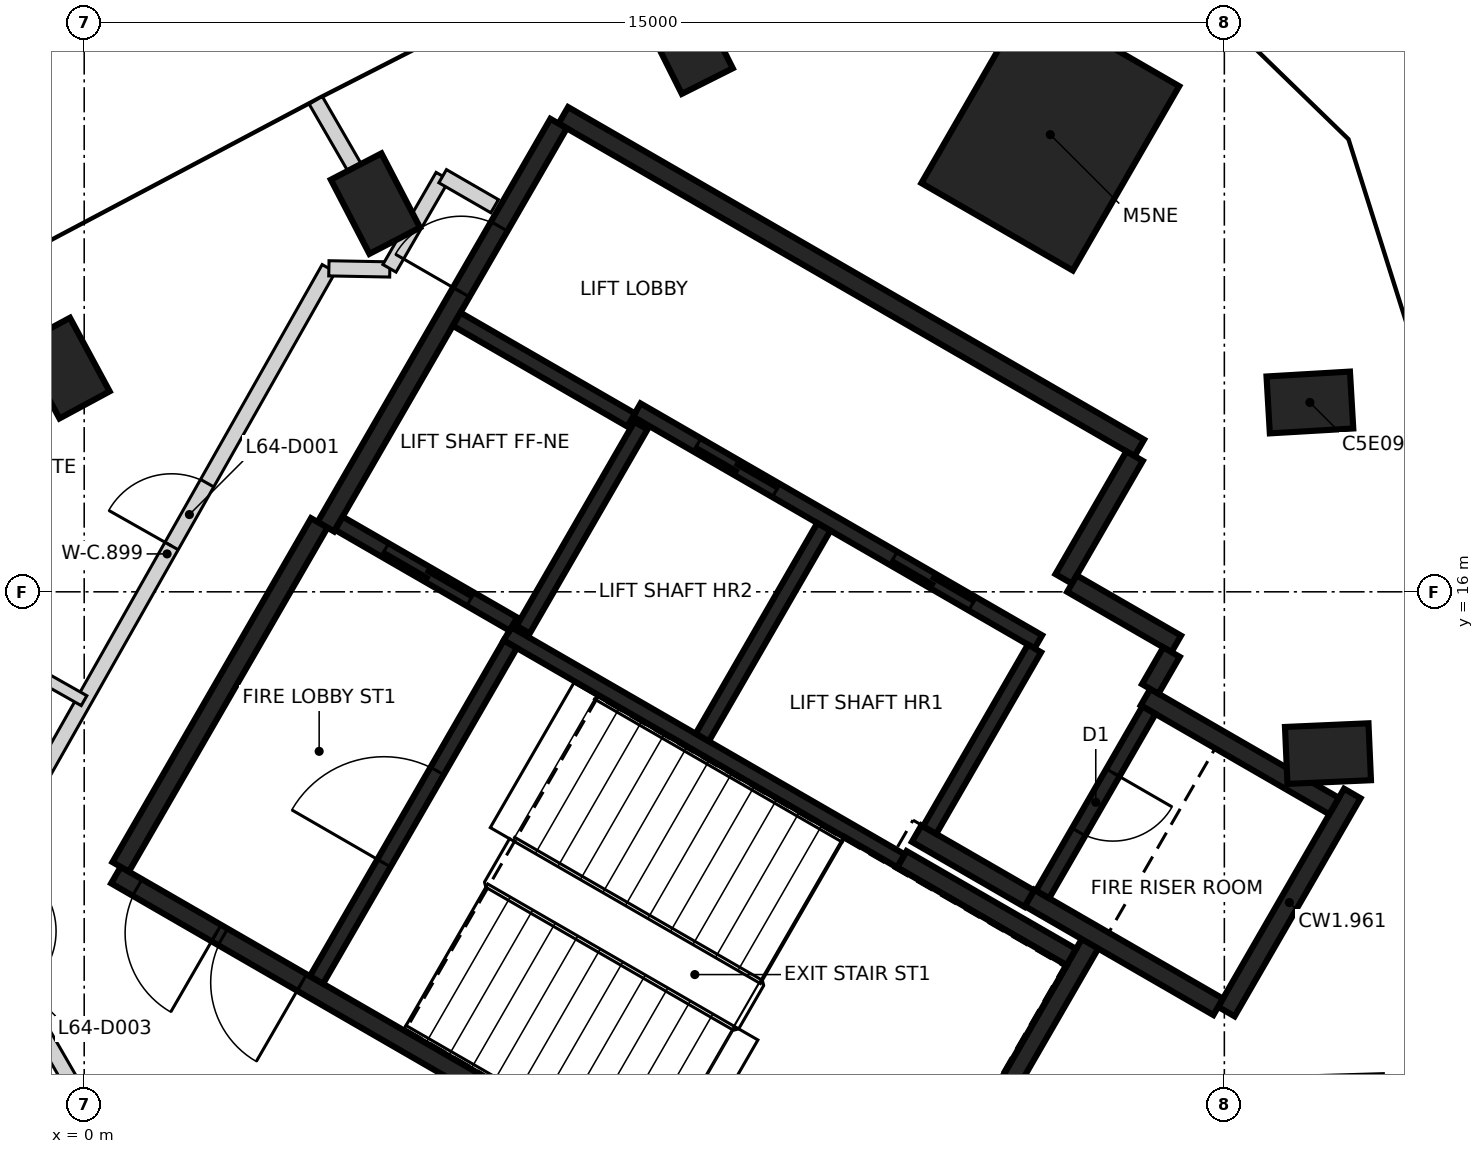
"""IFC4 building model, lengths in metres.
Left out: names, types, materials, properties, quantities, classifications, styles, units other than length and angle.
Written with IfcOpenShell. Run it as: python <this file> out.ifc"""

import sys

from ifc_helpers import new_model, si_unit, direction, frame, frame_2d, origin, origin_2d, place, context, subcontext, project, spatial, rectangle, extrude, element, fill, save


model = new_model("IFC4")
c1 = context("Model", 3, precision=1e-05, world=origin(), true_north=direction((0.0, 1.0)))
c2 = subcontext(c1, "Body", "Model", "MODEL_VIEW")
j1 = project(units=[si_unit("LENGTHUNIT", "METRE"), si_unit("PLANEANGLEUNIT", "RADIAN")], contexts=[c1])
p1 = place(None, origin())
s1 = spatial("IfcSite", under=j1, at=p1, CompositionType="ELEMENT")
p2 = place(p1, origin())
s2 = spatial("IfcBuilding", under=s1, at=p2, CompositionType="ELEMENT")
p3 = place(p2, frame((0.0, 0.0, 253.8)))
s3 = spatial("IfcBuildingStorey", under=s2, at=p3, CompositionType="ELEMENT", Elevation=253.8)
for number, where, z_axis, x_axis in (
    (1, (16.363, 13.872, -0.35), (0.0, 0.0, 1.0), (0.999, 0.044, 0.0)),
    (2, (16.125, 18.491, -0.35), (0.0, 0.0, 1.0), (0.998, 0.058, 0.0)),
    (3, (7.951, 23.211, -0.35), (0.0, 0.0, 1.0), (-0.449, 0.894, 0.0)),
    (4, (3.832, 21.107, -0.35), (0.0, 0.0, 1.0), (-0.461, 0.887, 0.0)),
    (5, (-0.256, 18.943, -0.35), (0.0, 0.0, 1.0), (-0.475, 0.88, 0.0)),
):
    element("IfcColumn", number, at=place(p3, frame(where, z_axis=z_axis, x_axis=x_axis)), inside=s3, PredefinedType="COLUMN", context=c2, shape_type="SweptSolid", body=[
        extrude(rectangle(XDim=1.1, YDim=0.75, at=origin_2d()), origin(), (0.0, 0.0, 1.0), 2.64),
    ])
p4 = place(p3, frame((12.71, 22.015, -0.35), z_axis=(0.0, 0.0, 1.0), x_axis=(0.5, 0.866025403784, 0.0)))
e6 = element("IfcColumn", 6, at=p4, inside=s3, PredefinedType="COLUMN", context=c2, shape_type="SweptSolid", body=[
    extrude(rectangle(XDim=2.8, YDim=2.3, at=origin_2d()), origin(), (0.0, 0.0, 1.0), 3.55),
])
p5 = place(p3, frame((10.42, 6.498, 0.0), z_axis=(0.0, 0.0, 1.0), x_axis=(-0.866021906294, 0.500006057782, 0.0)))
e7 = element("IfcWall", 7, at=p5, inside=s3, PredefinedType="SHEAR", context=c2, shape_type="SweptSolid", body=[
    extrude(rectangle(XDim=11.55, YDim=0.25, at=frame_2d((5.775, 0.0))), origin(), (0.0, 0.0, 1.0), 3.2),
])
p6 = place(p5, frame((10.025, 0.0, 0.0)))
e8 = element("IfcOpeningElement", 8, at=p6, cuts=e7, PredefinedType="OPENING", context=c2, shape_type="SweptSolid", body=[
    extrude(rectangle(XDim=1.2, YDim=2.1, at=frame_2d((0.6, 1.05))), frame((0.0, 0.135, 0.0), z_axis=(0.0, -1.0, 0.0), x_axis=(1.0, 0.0, 0.0)), (0.0, 0.0, 1.0), 0.27),
])
p7 = place(p5, frame((8.725, 0.0, 0.0)))
e9 = element("IfcOpeningElement", 9, at=p7, cuts=e7, PredefinedType="OPENING", context=c2, shape_type="SweptSolid", body=[
    extrude(rectangle(XDim=1.2, YDim=2.1, at=frame_2d((0.6, 1.05))), frame((0.0, 0.135, 0.0), z_axis=(0.0, -1.0, 0.0), x_axis=(1.0, 0.0, 0.0)), (0.0, 0.0, 1.0), 0.27),
])
p8 = place(p3, frame((6.304, 22.269, 0.0), z_axis=(0.0, 0.0, 1.0), x_axis=(0.866022959057, -0.500004234368, 0.0)))
e10 = element("IfcWall", 10, at=p8, inside=s3, PredefinedType="SHEAR", context=c2, shape_type="SweptSolid", body=[
    extrude(rectangle(XDim=8.75, YDim=0.25, at=frame_2d((4.375, 0.0))), origin(), (0.0, 0.0, 1.0), 3.2),
])
p9 = place(p3, frame((3.179, 16.856, 0.0), z_axis=(0.0, 0.0, 1.0), x_axis=(0.500001955336, 0.866024274868, 0.0)))
e11 = element("IfcWall", 11, at=p9, inside=s3, PredefinedType="SHEAR", context=c2, shape_type="SweptSolid", body=[
    extrude(rectangle(XDim=6.125, YDim=0.25, at=frame_2d((3.062, 0.0))), origin(), (0.0, 0.0, 1.0), 3.2),
])
p10 = place(p9, frame((3.563, 0.0, 0.0)))
e12 = element("IfcOpeningElement", 12, at=p10, cuts=e11, PredefinedType="OPENING", context=c2, shape_type="SweptSolid", body=[
    extrude(rectangle(XDim=1.0, YDim=2.1, at=frame_2d((0.5, 1.05))), frame((0.0, 0.135, 0.0), z_axis=(0.0, -1.0, 0.0), x_axis=(1.0, 0.0, 0.0)), (0.0, 0.0, 1.0), 0.27),
])
p11 = place(p3, frame((0.48, 12.381, 0.0), z_axis=(0.0, 0.0, 1.0), x_axis=(0.49999885962, 0.866026062182, 0.0)))
e13 = element("IfcWall", 13, at=p11, inside=s3, PredefinedType="SHEAR", context=c2, shape_type="SweptSolid", body=[
    extrude(rectangle(XDim=5.225, YDim=0.25, at=frame_2d((2.612, 0.0))), origin(), (0.0, 0.0, 1.0), 3.2),
])
p12 = place(p3, frame((13.238, 11.378, 0.0), z_axis=(0.0, 0.0, 1.0), x_axis=(-0.500008851346, -0.866020293397, 0.0)))
e14 = element("IfcWall", 14, at=p12, inside=s3, PredefinedType="SHEAR", context=c2, shape_type="SweptSolid", body=[
    extrude(rectangle(XDim=5.51, YDim=0.25, at=frame_2d((2.755, 0.0))), origin(), (0.0, 0.0, 1.0), 3.2),
])
p13 = place(p3, frame((16.684, 13.347, 0.0), z_axis=(0.0, 0.0, 1.0), x_axis=(-0.499998874531, -0.866026053573, 0.0)))
e15 = element("IfcWall", 15, at=p13, inside=s3, PredefinedType="SHEAR", context=c2, shape_type="SweptSolid", body=[
    extrude(rectangle(XDim=3.313, YDim=0.25, at=frame_2d((1.656, 0.0))), origin(), (0.0, 0.0, 1.0), 3.2),
])
p14 = place(p3, frame((14.918, 10.54, 0.0), z_axis=(0.0, 0.0, 1.0), x_axis=(-0.866063538972, 0.499933942099, 0.0)))
e16 = element("IfcWall", 16, at=p14, inside=s3, PredefinedType="SHEAR", context=c2, shape_type="SweptSolid", body=[
    extrude(rectangle(XDim=2.865, YDim=0.25, at=frame_2d((1.432, 0.0))), origin(), (0.0, 0.0, 1.0), 3.2),
])
p15 = place(p3, frame((13.963, 14.614, 0.0), z_axis=(0.0, 0.0, 1.0), x_axis=(0.866042235819, -0.499970844928, 0.0)))
e17 = element("IfcWall", 17, at=p15, inside=s3, PredefinedType="SHEAR", context=c2, shape_type="SweptSolid", body=[
    extrude(rectangle(XDim=2.865, YDim=0.25, at=frame_2d((1.432, 0.0))), origin(), (0.0, 0.0, 1.0), 3.2),
])
p16 = place(p3, frame((10.757, 12.481, 0.0), z_axis=(0.0, 0.0, 1.0), x_axis=(0.866022940537, -0.500004266446, 0.0)))
e18 = element("IfcWall", 18, at=p16, inside=s3, PredefinedType="SHEAR", context=c2, shape_type="SweptSolid", body=[
    extrude(rectangle(XDim=2.575, YDim=0.25, at=frame_2d((1.287, 0.0))), origin(), (0.0, 0.0, 1.0), 3.2),
])
p17 = place(p3, frame((13.819, 17.785, 0.0), z_axis=(0.0, 0.0, 1.0), x_axis=(-0.500039802285, -0.866002422705, 0.0)))
e19 = element("IfcWall", 19, at=p17, inside=s3, PredefinedType="SHEAR", context=c2, shape_type="SweptSolid", body=[
    extrude(rectangle(XDim=1.865, YDim=0.25, at=frame_2d((0.932, 0.0))), origin(), (0.0, 0.0, 1.0), 3.2),
])
p18 = place(p3, frame((12.433, 11.964, 0.0), z_axis=(0.0, 0.0, 1.0), x_axis=(-0.866038183914, 0.499977863513, 0.0)))
e20 = element("IfcWall", 20, at=p18, inside=s3, PredefinedType="SHEAR", context=c2, shape_type="SweptSolid", body=[
    extrude(rectangle(XDim=1.71, YDim=0.25, at=frame_2d((0.855, 0.0))), origin(), (0.0, 0.0, 1.0), 3.2),
])
p19 = place(p3, frame((12.995, 16.108, 0.0), z_axis=(0.0, 0.0, 1.0), x_axis=(0.866044474677, -0.49996696679, 0.0)))
e21 = element("IfcWall", 21, at=p19, inside=s3, PredefinedType="SHEAR", context=c2, shape_type="SweptSolid", body=[
    extrude(rectangle(XDim=1.584, YDim=0.25, at=frame_2d((0.792, 0.0))), origin(), (0.0, 0.0, 1.0), 3.2),
])
p20 = place(p3, frame((14.305, 15.207, 0.0), z_axis=(0.0, 0.0, 1.0), x_axis=(-0.499848422343, -0.866112899501, 0.0)))
e22 = element("IfcWall", 22, at=p20, inside=s3, PredefinedType="SHEAR", context=c2, shape_type="SweptSolid", body=[
    extrude(rectangle(XDim=0.559, YDim=0.25, at=frame_2d((0.28, 0.0))), origin(), (0.0, 0.0, 1.0), 3.2),
])
p21 = place(p3, frame((12.552, 15.342, 0.0), z_axis=(0.0, 0.0, 1.0), x_axis=(-0.866030299012, 0.499991521122, 0.0)))
e23 = element("IfcWall", 23, at=p21, inside=s3, PredefinedType="SHEAR", context=c2, shape_type="SweptSolid", body=[
    extrude(rectangle(XDim=6.1, YDim=0.2, at=frame_2d((3.05, 0.0))), origin(), (0.0, 0.0, 1.0), 3.2),
])
p22 = place(p21, frame((1.0, 0.0, 0.0)))
e24 = element("IfcOpeningElement", 24, at=p22, cuts=e23, PredefinedType="OPENING", context=c2, shape_type="SweptSolid", body=[
    extrude(rectangle(XDim=1.2, YDim=2.1, at=frame_2d((0.6, 1.05))), frame((0.0, 0.11, 0.0), z_axis=(0.0, -1.0, 0.0), x_axis=(1.0, 0.0, 0.0)), (0.0, 0.0, 1.0), 0.22),
])
p23 = place(p21, frame((3.982, 0.0, 0.0)))
e25 = element("IfcOpeningElement", 25, at=p23, cuts=e23, PredefinedType="OPENING", context=c2, shape_type="SweptSolid", body=[
    extrude(rectangle(XDim=1.2, YDim=2.1, at=frame_2d((0.6, 1.05))), frame((0.0, 0.11, 0.0), z_axis=(0.0, -1.0, 0.0), x_axis=(1.0, 0.0, 0.0)), (0.0, 0.0, 1.0), 0.22),
])
p24 = place(p3, frame((10.743, 12.46, 0.0), z_axis=(0.0, 0.0, 1.0), x_axis=(-0.866018848283, 0.500011354289, 0.0)))
e26 = element("IfcWall", 26, at=p24, inside=s3, PredefinedType="SHEAR", context=c2, shape_type="SweptSolid", body=[
    extrude(rectangle(XDim=5.974, YDim=0.2, at=frame_2d((2.987, 0.0))), origin(), (0.0, 0.0, 1.0), 3.2),
])
p25 = place(p3, frame((3.057, 10.895, 0.0), z_axis=(0.0, 0.0, 1.0), x_axis=(0.500027839223, 0.866009330205, 0.0)))
e27 = element("IfcWall", 27, at=p25, inside=s3, PredefinedType="SHEAR", context=c2, shape_type="SweptSolid", body=[
    extrude(rectangle(XDim=5.098, YDim=0.2, at=frame_2d((2.549, 0.0))), origin(), (0.0, 0.0, 1.0), 3.2),
])
p26 = place(p25, frame((1.774, 0.0, 0.0)))
e28 = element("IfcOpeningElement", 28, at=p26, cuts=e27, PredefinedType="OPENING", context=c2, shape_type="SweptSolid", body=[
    extrude(rectangle(XDim=1.4, YDim=2.1, at=frame_2d((0.7, 1.05))), frame((0.0, 0.11, 0.0), z_axis=(0.0, -1.0, 0.0), x_axis=(1.0, 0.0, 0.0)), (0.0, 0.0, 1.0), 0.22),
])
p27 = place(p3, frame((8.132, 14.084, 0.0), z_axis=(0.0, 0.0, 1.0), x_axis=(0.500030834389, 0.86600760081, 0.0)))
e29 = element("IfcWall", 29, at=p27, inside=s3, PredefinedType="SHEAR", context=c2, shape_type="SweptSolid", body=[
    extrude(rectangle(XDim=3.198, YDim=0.2, at=frame_2d((1.599, 0.0))), origin(), (0.0, 0.0, 1.0), 3.2),
])
p28 = place(p3, frame((14.008, 14.442, 0.0), z_axis=(0.0, 0.0, 1.0), x_axis=(-0.499986818241, -0.866033014143, 0.0)))
e30 = element("IfcWall", 30, at=p28, inside=s3, PredefinedType="SHEAR", context=c2, shape_type="SweptSolid", body=[
    extrude(rectangle(XDim=2.798, YDim=0.2, at=frame_2d((1.399, 0.0))), origin(), (0.0, 0.0, 1.0), 3.2),
])
p29 = place(p28, frame((0.949, 0.0, 0.0)))
e31 = element("IfcOpeningElement", 31, at=p29, cuts=e30, PredefinedType="OPENING", context=c2, shape_type="SweptSolid", body=[
    extrude(rectangle(XDim=0.9, YDim=2.1, at=frame_2d((0.45, 1.05))), frame((0.0, 0.11, 0.0), z_axis=(0.0, -1.0, 0.0), x_axis=(1.0, 0.0, 0.0)), (0.0, 0.0, 1.0), 0.22),
])
p30 = place(p3, frame((12.502, 15.255, 0.0), z_axis=(0.0, 0.0, 1.0), x_axis=(-0.499965018551, -0.866045599391, 0.0)))
e32 = element("IfcWall", 32, at=p30, inside=s3, PredefinedType="SHEAR", context=c2, shape_type="SweptSolid", body=[
    extrude(rectangle(XDim=2.759, YDim=0.2, at=frame_2d((1.379, 0.0))), origin(), (0.0, 0.0, 1.0), 3.2),
])
p31 = place(p3, frame((7.324, 18.187, 0.0), z_axis=(0.0, 0.0, 1.0), x_axis=(-0.499967891604, -0.866043940782, 0.0)))
e33 = element("IfcWall", 33, at=p31, inside=s3, PredefinedType="SHEAR", context=c2, shape_type="SweptSolid", body=[
    extrude(rectangle(XDim=3.1, YDim=0.2, at=frame_2d((1.55, 0.0))), origin(), (0.0, 0.0, 1.0), 3.2),
])
p32 = place(p3, frame((5.646, 15.576, 0.0), z_axis=(0.0, 0.0, 1.0), x_axis=(-0.866018407898, 0.500012117035, 0.0)))
e34 = element("IfcWall", 34, at=p32, inside=s3, PredefinedType="SHEAR", context=c2, shape_type="SweptSolid", body=[
    extrude(rectangle(XDim=2.651, YDim=0.2, at=frame_2d((1.325, 0.0))), origin(), (0.0, 0.0, 1.0), 3.2),
])
p33 = place(p32, frame((0.652, 0.0, 0.0)))
e35 = element("IfcOpeningElement", 35, at=p33, cuts=e34, PredefinedType="OPENING", context=c2, shape_type="SweptSolid", body=[
    extrude(rectangle(XDim=1.3, YDim=2.1, at=frame_2d((0.65, 1.05))), frame((0.0, 0.11, 0.0), z_axis=(0.0, -1.0, 0.0), x_axis=(1.0, 0.0, 0.0)), (0.0, 0.0, 1.0), 0.22),
])
p34 = place(p3, frame((7.196, 18.26, 0.0), z_axis=(0.0, 0.0, 1.0), x_axis=(-0.866018407898, 0.500012117035, 0.0)))
e36 = element("IfcWall", 36, at=p34, inside=s3, PredefinedType="SHEAR", context=c2, shape_type="SweptSolid", body=[
    extrude(rectangle(XDim=2.651, YDim=0.2, at=frame_2d((1.325, 0.0))), origin(), (0.0, 0.0, 1.0), 3.2),
])
p35 = place(p3, frame((-2.483, 13.551, 0.0), z_axis=(0.0, 0.0, 1.0), x_axis=(0.499878046143, -0.866095802429, 0.0)))
e37 = element("IfcWall", 37, at=p35, inside=s3, PredefinedType="PARTITIONING", context=c2, shape_type="SweptSolid", body=[
    extrude(rectangle(XDim=5.977, YDim=0.2, at=frame_2d((2.988, 0.0))), origin(), (0.0, 0.0, 1.0), 3.2),
])
p36 = place(p35, frame((2.327, 0.0, 0.0)))
e38 = element("IfcOpeningElement", 38, at=p36, cuts=e37, PredefinedType="OPENING", context=c2, shape_type="SweptSolid", body=[
    extrude(rectangle(XDim=0.95, YDim=2.1, at=frame_2d((0.475, 1.05))), frame((0.0, 0.11, 0.0), z_axis=(0.0, -1.0, 0.0), x_axis=(1.0, 0.0, 0.0)), (0.0, 0.0, 1.0), 0.22),
])
p37 = place(p3, frame((-1.037, 12.741, 0.0), z_axis=(0.0, 0.0, 1.0), x_axis=(0.492679417867, 0.870210888929, 0.0)))
e39 = element("IfcWall", 39, at=p37, inside=s3, PredefinedType="PARTITIONING", context=c2, shape_type="SweptSolid", body=[
    extrude(rectangle(XDim=8.636, YDim=0.2, at=frame_2d((4.318, 0.0))), origin(), (0.0, 0.0, 1.0), 3.2),
])
p38 = place(p37, frame((4.438, 0.0, 0.0)))
e40 = element("IfcOpeningElement", 40, at=p38, cuts=e39, PredefinedType="OPENING", context=c2, shape_type="SweptSolid", body=[
    extrude(rectangle(XDim=0.95, YDim=2.1, at=frame_2d((0.475, 1.05))), frame((0.0, 0.11, 0.0), z_axis=(0.0, -1.0, 0.0), x_axis=(1.0, 0.0, 0.0)), (0.0, 0.0, 1.0), 0.22),
])
p39 = place(p3, frame((3.219, 20.256, 0.0), z_axis=(0.0, 0.0, 1.0), x_axis=(0.999821939894, -0.018870307541, 0.0)))
e41 = element("IfcWall", 41, at=p39, inside=s3, PredefinedType="PARTITIONING", context=c2, shape_type="SweptSolid", body=[
    extrude(rectangle(XDim=0.802, YDim=0.2, at=frame_2d((0.401, 0.0))), origin(), (0.0, 0.0, 1.0), 3.2),
])
p40 = place(p3, frame((4.016, 20.256, 0.0), z_axis=(0.0, 0.0, 1.0), x_axis=(0.500135180047, 0.865947343479, 0.0)))
e42 = element("IfcWall", 42, at=p40, inside=s3, PredefinedType="PARTITIONING", context=c2, shape_type="SweptSolid", body=[
    extrude(rectangle(XDim=1.399, YDim=0.2, at=frame_2d((0.7, 0.0))), origin(), (0.0, 0.0, 1.0), 3.2),
])
p41 = place(p3, frame((4.716, 21.468, 0.0), z_axis=(0.0, 0.0, 1.0), x_axis=(0.865912682783, -0.500195187698, 0.0)))
e43 = element("IfcWall", 43, at=p41, inside=s3, PredefinedType="PARTITIONING", context=c2, shape_type="SweptSolid", body=[
    extrude(rectangle(XDim=0.79, YDim=0.2, at=frame_2d((0.395, 0.0))), origin(), (0.0, 0.0, 1.0), 3.2),
])
p42 = place(p3, frame((3.046, 22.466, 0.0), z_axis=(0.0, 0.0, 1.0), x_axis=(0.500078449558, -0.865980106173, 0.0)))
e44 = element("IfcWall", 44, at=p42, inside=s3, PredefinedType="PARTITIONING", context=c2, shape_type="SweptSolid", body=[
    extrude(rectangle(XDim=1.9, YDim=0.2, at=frame_2d((0.95, 0.0))), origin(), (0.0, 0.0, 1.0), 3.2),
])
p43 = place(p3, frame((-2.178, 15.8, 0.0), z_axis=(0.0, 0.0, 1.0), x_axis=(0.870218946292, -0.492665186019, 0.0)))
e45 = element("IfcWall", 45, at=p43, inside=s3, PredefinedType="PARTITIONING", context=c2, shape_type="SweptSolid", body=[
    extrude(rectangle(XDim=2.5, YDim=0.15, at=frame_2d((1.25, 0.0))), origin(), (0.0, 0.0, 1.0), 3.2),
])
p44 = place(p43, frame((0.85, 0.0, 0.0)))
e46 = element("IfcOpeningElement", 46, at=p44, cuts=e45, PredefinedType="OPENING", context=c2, shape_type="SweptSolid", body=[
    extrude(rectangle(XDim=0.8, YDim=2.1, at=frame_2d((0.4, 1.05))), frame((0.0, 0.085, 0.0), z_axis=(0.0, -1.0, 0.0), x_axis=(1.0, 0.0, 0.0)), (0.0, 0.0, 1.0), 0.17),
])
p45 = place(p33, origin())
e47 = element("IfcDoor", 47, at=p45, inside=s3, OperationType="SLIDING_TO_LEFT", PredefinedType="DOOR", context=c2, shape_type="SweptSolid", body=[
    extrude(rectangle(XDim=1.3, YDim=2.1, at=frame_2d((0.65, 1.05))), frame((0.0, 0.025, 0.0), z_axis=(0.0, -1.0, 0.0), x_axis=(1.0, 0.0, 0.0)), (0.0, 0.0, 1.0), 0.05),
])
fill(e35, e47)
p46 = place(p22, origin())
e48 = element("IfcDoor", 48, at=p46, inside=s3, OperationType="DOUBLE_DOOR_SLIDING", PredefinedType="DOOR", context=c2, shape_type="SweptSolid", body=[
    extrude(rectangle(XDim=1.2, YDim=2.1, at=frame_2d((0.6, 1.05))), frame((0.0, 0.025, 0.0), z_axis=(0.0, -1.0, 0.0), x_axis=(1.0, 0.0, 0.0)), (0.0, 0.0, 1.0), 0.05),
])
fill(e24, e48)
p47 = place(p23, origin())
e49 = element("IfcDoor", 49, at=p47, inside=s3, OperationType="DOUBLE_DOOR_SLIDING", PredefinedType="DOOR", context=c2, shape_type="SweptSolid", body=[
    extrude(rectangle(XDim=1.2, YDim=2.1, at=frame_2d((0.6, 1.05))), frame((0.0, 0.025, 0.0), z_axis=(0.0, -1.0, 0.0), x_axis=(1.0, 0.0, 0.0)), (0.0, 0.0, 1.0), 0.05),
])
fill(e25, e49)
p48 = place(p10, origin())
e50 = element("IfcDoor", 50, at=p48, inside=s3, OperationType="SINGLE_SWING_LEFT", PredefinedType="DOOR", context=c2, shape_type="SweptSolid", body=[
    extrude(rectangle(XDim=1.0, YDim=2.1, at=frame_2d((0.5, 1.05))), frame((0.0, 0.025, 0.0), z_axis=(0.0, -1.0, 0.0), x_axis=(1.0, 0.0, 0.0)), (0.0, 0.0, 1.0), 0.05),
])
fill(e12, e50)
p49 = place(p6, origin())
e51 = element("IfcDoor", 51, at=p49, inside=s3, OperationType="SINGLE_SWING_LEFT", PredefinedType="DOOR", context=c2, shape_type="SweptSolid", body=[
    extrude(rectangle(XDim=1.2, YDim=2.1, at=frame_2d((0.6, 1.05))), frame((0.0, 0.025, 0.0), z_axis=(0.0, -1.0, 0.0), x_axis=(1.0, 0.0, 0.0)), (0.0, 0.0, 1.0), 0.05),
])
fill(e8, e51)
p50 = place(p7, origin())
e52 = element("IfcDoor", 52, at=p50, inside=s3, OperationType="SINGLE_SWING_RIGHT", PredefinedType="DOOR", context=c2, shape_type="SweptSolid", body=[
    extrude(rectangle(XDim=1.2, YDim=2.1, at=frame_2d((0.6, 1.05))), frame((0.0, 0.025, 0.0), z_axis=(0.0, -1.0, 0.0), x_axis=(1.0, 0.0, 0.0)), (0.0, 0.0, 1.0), 0.05),
])
fill(e9, e52)
p51 = place(p26, origin())
e53 = element("IfcDoor", 53, at=p51, inside=s3, OperationType="SINGLE_SWING_LEFT", PredefinedType="DOOR", context=c2, shape_type="SweptSolid", body=[
    extrude(rectangle(XDim=1.4, YDim=2.1, at=frame_2d((0.7, 1.05))), frame((0.0, 0.025, 0.0), z_axis=(0.0, -1.0, 0.0), x_axis=(1.0, 0.0, 0.0)), (0.0, 0.0, 1.0), 0.05),
])
fill(e28, e53)
p52 = place(p29, origin())
e54 = element("IfcDoor", 54, at=p52, inside=s3, OperationType="SINGLE_SWING_RIGHT", PredefinedType="DOOR", context=c2, shape_type="SweptSolid", body=[
    extrude(rectangle(XDim=0.9, YDim=2.1, at=frame_2d((0.45, 1.05))), frame((0.0, 0.025, 0.0), z_axis=(0.0, -1.0, 0.0), x_axis=(1.0, 0.0, 0.0)), (0.0, 0.0, 1.0), 0.05),
])
fill(e31, e54)
p53 = place(p38, origin())
e55 = element("IfcDoor", 55, at=p53, inside=s3, OperationType="SINGLE_SWING_LEFT", PredefinedType="DOOR", context=c2, shape_type="SweptSolid", body=[
    extrude(rectangle(XDim=0.95, YDim=2.1, at=frame_2d((0.475, 1.05))), frame((0.0, 0.025, 0.0), z_axis=(0.0, -1.0, 0.0), x_axis=(1.0, 0.0, 0.0)), (0.0, 0.0, 1.0), 0.05),
])
fill(e40, e55)
save(model, sys.argv[1])
